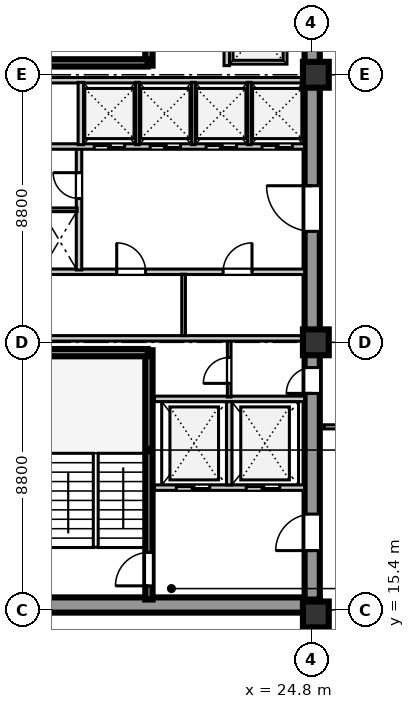
"""IFC4 building model, lengths in metres.
Left out: names, types, materials, properties, quantities, classifications, styles, units other than length and angle.
Written with IfcOpenShell. Run it as: python <this file> out.ifc"""

import sys

from ifc_helpers import new_model, si_unit, direction, frame, frame_2d, origin, origin_2d, place, context, subcontext, project, spatial, rectangle, extrude, element, fill, save


model = new_model("IFC4")
c1 = context("Model", 3, precision=1e-05, world=origin(), true_north=direction((0.0, 1.0)))
c2 = subcontext(c1, "Body", "Model", "MODEL_VIEW")
j1 = project(units=[si_unit("LENGTHUNIT", "METRE"), si_unit("PLANEANGLEUNIT", "RADIAN")], contexts=[c1])
p1 = place(None, origin())
s1 = spatial("IfcSite", under=j1, at=p1, CompositionType="ELEMENT")
p2 = place(p1, origin())
s2 = spatial("IfcBuilding", under=s1, at=p2, CompositionType="ELEMENT")
p3 = place(p2, frame((0.0, 0.0, 119.4)))
s3 = spatial("IfcBuildingStorey", under=s2, at=p3, CompositionType="ELEMENT", Elevation=119.4)
p4 = place(p3, frame((15.4, 15.56, 0.0), z_axis=(0.0, 0.0, 1.0), x_axis=(1.0, 0.0, 0.0)))
e1 = element("IfcWall", 1, at=p4, inside=s3, PredefinedType="SHEAR", context=c2, shape_type="SweptSolid", body=[
    extrude(rectangle(XDim=9.68, YDim=0.5, at=frame_2d((4.84, 0.0))), origin(), (0.0, 0.0, 1.0), 3.6),
])
p5 = place(p3, frame((24.83, 15.74, 0.0), z_axis=(0.0, 0.0, 1.0), x_axis=(0.0, 1.0, 0.0)))
e2 = element("IfcWall", 2, at=p5, inside=s3, PredefinedType="SHEAR", context=c2, shape_type="SweptSolid", body=[
    extrude(rectangle(XDim=25.76, YDim=0.5, at=frame_2d((12.88, 0.0))), origin(), (0.0, 0.0, 1.0), 3.6),
])
p6 = place(p5, frame((1.61, 0.0, 0.0)))
e3 = element("IfcOpeningElement", 3, at=p6, cuts=e2, PredefinedType="OPENING", context=c2, shape_type="SweptSolid", body=[
    extrude(rectangle(XDim=1.2, YDim=2.1, at=frame_2d((0.6, 1.05))), frame((0.0, 0.26, 0.0), z_axis=(0.0, -1.0, 0.0), x_axis=(1.0, 0.0, 0.0)), (0.0, 0.0, 1.0), 0.52),
])
p7 = place(p5, frame((6.78, 0.0, 0.0)))
e4 = element("IfcOpeningElement", 4, at=p7, cuts=e2, PredefinedType="OPENING", context=c2, shape_type="SweptSolid", body=[
    extrude(rectangle(XDim=0.85, YDim=2.06, at=frame_2d((0.425, 1.03))), frame((0.0, 0.26, 0.0), z_axis=(0.0, -1.0, 0.0), x_axis=(1.0, 0.0, 0.0)), (0.0, 0.0, 1.0), 0.52),
])
p8 = place(p5, frame((12.11, 0.0, 0.0)))
e5 = element("IfcOpeningElement", 5, at=p8, cuts=e2, PredefinedType="OPENING", context=c2, shape_type="SweptSolid", body=[
    extrude(rectangle(XDim=1.5, YDim=2.12, at=frame_2d((0.75, 1.06))), frame((0.0, 0.26, 0.0), z_axis=(0.0, -1.0, 0.0), x_axis=(1.0, 0.0, 0.0)), (0.0, 0.0, 1.0), 0.52),
])
p9 = place(p5, frame((20.11, 0.0, 0.0)))
e6 = element("IfcOpeningElement", 6, at=p9, cuts=e2, PredefinedType="OPENING", context=c2, shape_type="SweptSolid", body=[
    extrude(rectangle(XDim=1.2, YDim=2.12, at=frame_2d((0.6, 1.06))), frame((0.0, 0.26, 0.0), z_axis=(0.0, -1.0, 0.0), x_axis=(1.0, 0.0, 0.0)), (0.0, 0.0, 1.0), 0.52),
])
p10 = place(p5, frame((24.01, 0.0, 0.0)))
e7 = element("IfcOpeningElement", 7, at=p10, cuts=e2, PredefinedType="OPENING", context=c2, shape_type="SweptSolid", body=[
    extrude(rectangle(XDim=0.95, YDim=2.1, at=frame_2d((0.475, 1.05))), frame((0.0, 0.26, 0.0), z_axis=(0.0, -1.0, 0.0), x_axis=(1.0, 0.0, 0.0)), (0.0, 0.0, 1.0), 0.52),
])
for number, where, z_axis, x_axis in (
    (8, (24.95, 15.25, 0.0), (0.0, 0.0, 1.0), (1.0, 0.0, 0.0)),
    (9, (24.95, 24.2, 0.0), (0.0, 0.0, 1.0), (1.0, 0.0, 0.0)),
    (10, (24.95, 33.0, 0.0), (0.0, 0.0, 1.0), (1.0, 0.0, 0.0)),
):
    element("IfcColumn", number, at=place(p3, frame(where, z_axis=z_axis, x_axis=x_axis)), inside=s3, PredefinedType="COLUMN", context=c2, shape_type="SweptSolid", body=[
        extrude(rectangle(XDim=0.85, YDim=0.85, at=origin_2d()), origin(), (0.0, 0.0, 1.0), 3.6),
    ])
p11 = place(p3, frame((19.46, 15.74, 0.0), z_axis=(0.0, 0.0, 1.0), x_axis=(0.0, 1.0, 0.0)))
e11 = element("IfcWall", 11, at=p11, inside=s3, PredefinedType="SHEAR", context=c2, shape_type="SweptSolid", body=[
    extrude(rectangle(XDim=8.2, YDim=0.24, at=frame_2d((4.1, 0.0))), origin(), (0.0, 0.0, 1.0), 3.85),
])
p12 = place(p11, frame((0.45, 0.0, 0.0)))
e12 = element("IfcOpeningElement", 12, at=p12, cuts=e11, PredefinedType="OPENING", context=c2, shape_type="SweptSolid", body=[
    extrude(rectangle(XDim=1.1, YDim=2.1, at=frame_2d((0.55, 1.05))), frame((0.0, 0.13, 0.0), z_axis=(0.0, -1.0, 0.0), x_axis=(1.0, 0.0, 0.0)), (0.0, 0.0, 1.0), 0.26),
])
p13 = place(p3, frame((15.9, 23.86, 0.0), z_axis=(0.0, 0.0, 1.0), x_axis=(1.0, 0.0, 0.0)))
e13 = element("IfcWall", 13, at=p13, inside=s3, PredefinedType="SHEAR", context=c2, shape_type="SweptSolid", body=[
    extrude(rectangle(XDim=3.52, YDim=0.24, at=frame_2d((1.76, 0.0))), origin(), (0.0, 0.0, 1.0), 3.85),
])
p14 = place(p3, frame((19.64, 19.42, 0.0), z_axis=(0.0, 0.0, 1.0), x_axis=(1.0, 0.0, 0.0)))
e14 = element("IfcWall", 14, at=p14, inside=s3, PredefinedType="SOLIDWALL", context=c2, shape_type="SweptSolid", body=[
    extrude(rectangle(XDim=4.94, YDim=0.18, at=frame_2d((2.47, 0.0))), origin(), (0.0, 0.0, 1.0), 3.6),
])
p15 = place(p14, frame((0.72, 0.0, 0.0)))
e15 = element("IfcOpeningElement", 15, at=p15, cuts=e14, PredefinedType="OPENING", context=c2, shape_type="SweptSolid", body=[
    extrude(rectangle(XDim=1.1, YDim=2.1, at=frame_2d((0.55, 1.05))), frame((0.0, 0.1, 0.0), z_axis=(0.0, -1.0, 0.0), x_axis=(1.0, 0.0, 0.0)), (0.0, 0.0, 1.0), 0.2),
])
p16 = place(p14, frame((3.02, 0.0, 0.0)))
e16 = element("IfcOpeningElement", 16, at=p16, cuts=e14, PredefinedType="OPENING", context=c2, shape_type="SweptSolid", body=[
    extrude(rectangle(XDim=1.1, YDim=2.1, at=frame_2d((0.55, 1.05))), frame((0.0, 0.1, 0.0), z_axis=(0.0, -1.0, 0.0), x_axis=(1.0, 0.0, 0.0)), (0.0, 0.0, 1.0), 0.2),
])
p17 = place(p3, frame((22.1, 19.51, 0.0), z_axis=(0.0, 0.0, 1.0), x_axis=(0.0, 1.0, 0.0)))
e17 = element("IfcWall", 17, at=p17, inside=s3, PredefinedType="SOLIDWALL", context=c2, shape_type="SweptSolid", body=[
    extrude(rectangle(XDim=2.74, YDim=0.18, at=frame_2d((1.37, 0.0))), origin(), (0.0, 0.0, 1.0), 3.6),
])
p18 = place(p3, frame((19.64, 22.34, 0.0), z_axis=(0.0, 0.0, 1.0), x_axis=(1.0, 0.0, 0.0)))
e18 = element("IfcWall", 18, at=p18, inside=s3, PredefinedType="SOLIDWALL", context=c2, shape_type="SweptSolid", body=[
    extrude(rectangle(XDim=4.94, YDim=0.18, at=frame_2d((2.47, 0.0))), origin(), (0.0, 0.0, 1.0), 3.6),
])
p19 = place(p3, frame((22.1, 22.4, 0.0), z_axis=(0.0, 0.0, 1.0), x_axis=(0.0, 1.0, 0.0)))
e19 = element("IfcWall", 19, at=p19, inside=s3, PredefinedType="PARTITIONING", context=c2, shape_type="SweptSolid", body=[
    extrude(rectangle(XDim=1.88, YDim=0.12, at=frame_2d((0.94, 0.0))), origin(), (0.0, 0.0, 1.0), 3.6),
])
p20 = place(p19, frame((0.45, 0.0, 0.0)))
e20 = element("IfcOpeningElement", 20, at=p20, cuts=e19, PredefinedType="OPENING", context=c2, shape_type="SweptSolid", body=[
    extrude(rectangle(XDim=0.85, YDim=2.06, at=frame_2d((0.425, 1.03))), frame((0.0, 0.07, 0.0), z_axis=(0.0, -1.0, 0.0), x_axis=(1.0, 0.0, 0.0)), (0.0, 0.0, 1.0), 0.14),
])
p21 = place(p3, frame((15.9, 26.52, 0.0), z_axis=(0.0, 0.0, 1.0), x_axis=(1.0, 0.0, 0.0)))
e21 = element("IfcWall", 21, at=p21, inside=s3, PredefinedType="SOLIDWALL", context=c2, shape_type="SweptSolid", body=[
    extrude(rectangle(XDim=8.68, YDim=0.18, at=frame_2d((4.34, 0.0))), origin(), (0.0, 0.0, 1.0), 3.6),
])
p22 = place(p21, frame((2.5, 0.0, 0.0)))
e22 = element("IfcOpeningElement", 22, at=p22, cuts=e21, PredefinedType="OPENING", context=c2, shape_type="SweptSolid", body=[
    extrude(rectangle(XDim=0.95, YDim=2.1, at=frame_2d((0.475, 1.05))), frame((0.0, 0.1, 0.0), z_axis=(0.0, -1.0, 0.0), x_axis=(1.0, 0.0, 0.0)), (0.0, 0.0, 1.0), 0.2),
])
p23 = place(p21, frame((6.0, 0.0, 0.0)))
e23 = element("IfcOpeningElement", 23, at=p23, cuts=e21, PredefinedType="OPENING", context=c2, shape_type="SweptSolid", body=[
    extrude(rectangle(XDim=0.95, YDim=2.1, at=frame_2d((0.475, 1.05))), frame((0.0, 0.1, 0.0), z_axis=(0.0, -1.0, 0.0), x_axis=(1.0, 0.0, 0.0)), (0.0, 0.0, 1.0), 0.2),
])
p24 = place(p3, frame((15.9, 24.33, 0.0), z_axis=(0.0, 0.0, 1.0), x_axis=(1.0, 0.0, 0.0)))
e24 = element("IfcWall", 24, at=p24, inside=s3, PredefinedType="SOLIDWALL", context=c2, shape_type="SweptSolid", body=[
    extrude(rectangle(XDim=8.68, YDim=0.18, at=frame_2d((4.34, 0.0))), origin(), (0.0, 0.0, 1.0), 2.95),
])
p25 = place(p3, frame((20.6, 24.42, 0.0), z_axis=(0.0, 0.0, 1.0), x_axis=(0.0, 1.0, 0.0)))
e25 = element("IfcWall", 25, at=p25, inside=s3, PredefinedType="PARTITIONING", context=c2, shape_type="SweptSolid", body=[
    extrude(rectangle(XDim=2.02, YDim=0.12, at=frame_2d((1.01, 0.0))), origin(), (0.0, 0.0, 1.0), 3.6),
])
p26 = place(p3, frame((17.16, 26.58, 0.0), z_axis=(0.0, 0.0, 1.0), x_axis=(0.0, 1.0, 0.0)))
e26 = element("IfcWall", 26, at=p26, inside=s3, PredefinedType="SOLIDWALL", context=c2, shape_type="SweptSolid", body=[
    extrude(rectangle(XDim=4.02, YDim=0.18, at=frame_2d((2.01, 0.0))), origin(), (0.0, 0.0, 1.0), 3.6),
])
p27 = place(p26, frame((2.35, 0.0, 0.0)))
e27 = element("IfcOpeningElement", 27, at=p27, cuts=e26, PredefinedType="OPENING", context=c2, shape_type="SweptSolid", body=[
    extrude(rectangle(XDim=0.85, YDim=2.06, at=frame_2d((0.425, 1.03))), frame((0.0, 0.1, 0.0), z_axis=(0.0, -1.0, 0.0), x_axis=(1.0, 0.0, 0.0)), (0.0, 0.0, 1.0), 0.2),
])
p28 = place(p3, frame((15.9, 28.56, 0.0), z_axis=(0.0, 0.0, 1.0), x_axis=(1.0, 0.0, 0.0)))
e28 = element("IfcWall", 28, at=p28, inside=s3, PredefinedType="PARTITIONING", context=c2, shape_type="SweptSolid", body=[
    extrude(rectangle(XDim=1.2, YDim=0.12, at=frame_2d((0.6, 0.0))), origin(), (0.0, 0.0, 1.0), 3.6),
])
p29 = place(p3, frame((15.9, 30.64, 0.0), z_axis=(0.0, 0.0, 1.0), x_axis=(1.0, 0.0, 0.0)))
e29 = element("IfcWall", 29, at=p29, inside=s3, PredefinedType="SOLIDWALL", context=c2, shape_type="SweptSolid", body=[
    extrude(rectangle(XDim=8.68, YDim=0.18, at=frame_2d((4.34, 0.0))), origin(), (0.0, 0.0, 1.0), 3.6),
])
p30 = place(p29, frame((1.76, 0.0, 0.0)))
e30 = element("IfcOpeningElement", 30, at=p30, cuts=e29, PredefinedType="OPENING", context=c2, shape_type="SweptSolid", body=[
    extrude(rectangle(XDim=1.0, YDim=2.1, at=frame_2d((0.5, 1.05))), frame((0.0, 0.1, 0.0), z_axis=(0.0, -1.0, 0.0), x_axis=(1.0, 0.0, 0.0)), (0.0, 0.0, 1.0), 0.2),
])
p31 = place(p29, frame((3.6, 0.0, 0.0)))
e31 = element("IfcOpeningElement", 31, at=p31, cuts=e29, PredefinedType="OPENING", context=c2, shape_type="SweptSolid", body=[
    extrude(rectangle(XDim=1.0, YDim=2.1, at=frame_2d((0.5, 1.05))), frame((0.0, 0.1, 0.0), z_axis=(0.0, -1.0, 0.0), x_axis=(1.0, 0.0, 0.0)), (0.0, 0.0, 1.0), 0.2),
])
p32 = place(p29, frame((5.44, 0.0, 0.0)))
e32 = element("IfcOpeningElement", 32, at=p32, cuts=e29, PredefinedType="OPENING", context=c2, shape_type="SweptSolid", body=[
    extrude(rectangle(XDim=1.0, YDim=2.1, at=frame_2d((0.5, 1.05))), frame((0.0, 0.1, 0.0), z_axis=(0.0, -1.0, 0.0), x_axis=(1.0, 0.0, 0.0)), (0.0, 0.0, 1.0), 0.2),
])
p33 = place(p29, frame((7.28, 0.0, 0.0)))
e33 = element("IfcOpeningElement", 33, at=p33, cuts=e29, PredefinedType="OPENING", context=c2, shape_type="SweptSolid", body=[
    extrude(rectangle(XDim=1.0, YDim=2.1, at=frame_2d((0.5, 1.05))), frame((0.0, 0.1, 0.0), z_axis=(0.0, -1.0, 0.0), x_axis=(1.0, 0.0, 0.0)), (0.0, 0.0, 1.0), 0.2),
])
p34 = place(p3, frame((15.9, 32.82, 0.0), z_axis=(0.0, 0.0, 1.0), x_axis=(1.0, 0.0, 0.0)))
e34 = element("IfcWall", 34, at=p34, inside=s3, PredefinedType="SOLIDWALL", context=c2, shape_type="SweptSolid", body=[
    extrude(rectangle(XDim=8.68, YDim=0.18, at=frame_2d((4.34, 0.0))), origin(), (0.0, 0.0, 1.0), 2.95),
])
p35 = place(p3, frame((17.22, 30.7, 0.0), z_axis=(0.0, 0.0, 1.0), x_axis=(0.0, 1.0, 0.0)))
e35 = element("IfcWall", 35, at=p35, inside=s3, PredefinedType="SOLIDWALL", context=c2, shape_type="SweptSolid", body=[
    extrude(rectangle(XDim=2.05, YDim=0.18, at=frame_2d((1.025, 0.0))), origin(), (0.0, 0.0, 1.0), 3.6),
])
for number, where, z_axis, x_axis in (
    (36, (19.08, 30.7, 0.0), (0.0, 0.0, 1.0), (0.0, 1.0, 0.0)),
    (37, (20.92, 30.7, 0.0), (0.0, 0.0, 1.0), (0.0, 1.0, 0.0)),
    (38, (22.76, 30.7, 0.0), (0.0, 0.0, 1.0), (0.0, 1.0, 0.0)),
):
    element("IfcWall", number, at=place(p3, frame(where, z_axis=z_axis, x_axis=x_axis)), inside=s3, PredefinedType="PARTITIONING", context=c2, shape_type="SweptSolid", body=[
        extrude(rectangle(XDim=2.05, YDim=0.12, at=frame_2d((1.025, 0.0))), origin(), (0.0, 0.0, 1.0), 3.6),
    ])
p36 = place(p3, frame((19.46, 33.3, 0.0), z_axis=(0.0, 0.0, 1.0), x_axis=(0.0, 1.0, 0.0)))
e39 = element("IfcWall", 39, at=p36, inside=s3, PredefinedType="SHEAR", context=c2, shape_type="SweptSolid", body=[
    extrude(rectangle(XDim=8.18, YDim=0.24, at=frame_2d((4.09, 0.0))), origin(), (0.0, 0.0, 1.0), 3.85),
])
p37 = place(p36, frame((0.65, 0.0, 0.0)))
e40 = element("IfcOpeningElement", 40, at=p37, cuts=e39, PredefinedType="OPENING", context=c2, shape_type="SweptSolid", body=[
    extrude(rectangle(XDim=1.1, YDim=2.1, at=frame_2d((0.55, 1.05))), frame((0.0, 0.13, 0.0), z_axis=(0.0, -1.0, 0.0), x_axis=(1.0, 0.0, 0.0)), (0.0, 0.0, 1.0), 0.26),
])
p38 = place(p3, frame((15.9, 33.39, 0.0), z_axis=(0.0, 0.0, 1.0), x_axis=(1.0, 0.0, 0.0)))
e41 = element("IfcWall", 41, at=p38, inside=s3, PredefinedType="SHEAR", context=c2, shape_type="SweptSolid", body=[
    extrude(rectangle(XDim=3.52, YDim=0.24, at=frame_2d((1.76, 0.0))), origin(), (0.0, 0.0, 1.0), 3.85),
])
p39 = place(p3, frame((22.02, 33.3, 0.0), z_axis=(0.0, 0.0, 1.0), x_axis=(0.0, 1.0, 0.0)))
e42 = element("IfcWall", 42, at=p39, inside=s3, PredefinedType="SOLIDWALL", context=c2, shape_type="SweptSolid", body=[
    extrude(rectangle(XDim=2.01, YDim=0.18, at=frame_2d((1.005, 0.0))), origin(), (0.0, 0.0, 1.0), 3.6),
])
p40 = place(p3, frame((25.22, 21.42, 0.0), z_axis=(0.0, 0.0, 1.0), x_axis=(1.0, 0.0, 0.0)))
e43 = element("IfcWall", 43, at=p40, inside=s3, PredefinedType="PARTITIONING", context=c2, shape_type="SweptSolid", body=[
    extrude(rectangle(XDim=15.6, YDim=0.135, at=frame_2d((7.8, 0.0))), origin(), (0.0, 0.0, 1.0), 3.2),
])
p41 = place(p40, frame((0.73, 0.0, 0.0)))
e44 = element("IfcOpeningElement", 44, at=p41, cuts=e43, PredefinedType="OPENING", context=c2, shape_type="SweptSolid", body=[
    extrude(rectangle(XDim=0.95, YDim=2.1, at=frame_2d((0.475, 1.05))), frame((0.0, 0.078, 0.0), z_axis=(0.0, -1.0, 0.0), x_axis=(1.0, 0.0, 0.0)), (0.0, 0.0, 1.0), 0.155),
])
p42 = place(p40, frame((8.43, 0.0, 0.0)))
e45 = element("IfcOpeningElement", 45, at=p42, cuts=e43, PredefinedType="OPENING", context=c2, shape_type="SweptSolid", body=[
    extrude(rectangle(XDim=0.95, YDim=2.1, at=frame_2d((0.475, 1.05))), frame((0.0, 0.078, 0.0), z_axis=(0.0, -1.0, 0.0), x_axis=(1.0, 0.0, 0.0)), (0.0, 0.0, 1.0), 0.155),
])
p43 = place(p12, origin())
e46 = element("IfcDoor", 46, at=p43, inside=s3, OperationType="SINGLE_SWING_LEFT", PredefinedType="DOOR", context=c2, shape_type="SweptSolid", body=[
    extrude(rectangle(XDim=1.1, YDim=2.1, at=frame_2d((0.55, 1.05))), frame((0.0, 0.025, 0.0), z_axis=(0.0, -1.0, 0.0), x_axis=(1.0, 0.0, 0.0)), (0.0, 0.0, 1.0), 0.05),
])
fill(e12, e46)
p44 = place(p15, origin())
e47 = element("IfcDoor", 47, at=p44, inside=s3, OperationType="DOUBLE_DOOR_SLIDING", PredefinedType="DOOR", context=c2, shape_type="SweptSolid", body=[
    extrude(rectangle(XDim=1.1, YDim=2.1, at=frame_2d((0.55, 1.05))), frame((0.0, 0.025, 0.0), z_axis=(0.0, -1.0, 0.0), x_axis=(1.0, 0.0, 0.0)), (0.0, 0.0, 1.0), 0.05),
])
fill(e15, e47)
p45 = place(p16, origin())
e48 = element("IfcDoor", 48, at=p45, inside=s3, OperationType="DOUBLE_DOOR_SLIDING", PredefinedType="DOOR", context=c2, shape_type="SweptSolid", body=[
    extrude(rectangle(XDim=1.1, YDim=2.1, at=frame_2d((0.55, 1.05))), frame((0.0, 0.025, 0.0), z_axis=(0.0, -1.0, 0.0), x_axis=(1.0, 0.0, 0.0)), (0.0, 0.0, 1.0), 0.05),
])
fill(e16, e48)
p46 = place(p6, frame((1.2, 0.0, 0.0), z_axis=(0.0, 0.0, 1.0), x_axis=(-1.0, 0.0, 0.0)))
e49 = element("IfcDoor", 49, at=p46, inside=s3, OperationType="SINGLE_SWING_RIGHT", PredefinedType="DOOR", context=c2, shape_type="SweptSolid", body=[
    extrude(rectangle(XDim=1.2, YDim=2.1, at=frame_2d((0.6, 1.05))), frame((0.0, 0.025, 0.0), z_axis=(0.0, -1.0, 0.0), x_axis=(1.0, 0.0, 0.0)), (0.0, 0.0, 1.0), 0.05),
])
fill(e3, e49)
p47 = place(p20, origin())
e50 = element("IfcDoor", 50, at=p47, inside=s3, OperationType="SINGLE_SWING_LEFT", PredefinedType="DOOR", context=c2, shape_type="SweptSolid", body=[
    extrude(rectangle(XDim=0.85, YDim=2.06, at=frame_2d((0.425, 1.03))), frame((0.0, 0.025, 0.0), z_axis=(0.0, -1.0, 0.0), x_axis=(1.0, 0.0, 0.0)), (0.0, 0.0, 1.0), 0.05),
])
fill(e20, e50)
p48 = place(p7, frame((0.85, 0.0, 0.0), z_axis=(0.0, 0.0, 1.0), x_axis=(-1.0, 0.0, 0.0)))
e51 = element("IfcDoor", 51, at=p48, inside=s3, OperationType="SINGLE_SWING_RIGHT", PredefinedType="DOOR", context=c2, shape_type="SweptSolid", body=[
    extrude(rectangle(XDim=0.85, YDim=2.06, at=frame_2d((0.425, 1.03))), frame((0.0, 0.025, 0.0), z_axis=(0.0, -1.0, 0.0), x_axis=(1.0, 0.0, 0.0)), (0.0, 0.0, 1.0), 0.05),
])
fill(e4, e51)
p49 = place(p22, origin())
e52 = element("IfcDoor", 52, at=p49, inside=s3, OperationType="SINGLE_SWING_LEFT", PredefinedType="DOOR", context=c2, shape_type="SweptSolid", body=[
    extrude(rectangle(XDim=0.95, YDim=2.1, at=frame_2d((0.475, 1.05))), frame((0.0, 0.025, 0.0), z_axis=(0.0, -1.0, 0.0), x_axis=(1.0, 0.0, 0.0)), (0.0, 0.0, 1.0), 0.05),
])
fill(e22, e52)
p50 = place(p23, origin())
e53 = element("IfcDoor", 53, at=p50, inside=s3, OperationType="SINGLE_SWING_RIGHT", PredefinedType="DOOR", context=c2, shape_type="SweptSolid", body=[
    extrude(rectangle(XDim=0.95, YDim=2.1, at=frame_2d((0.475, 1.05))), frame((0.0, 0.025, 0.0), z_axis=(0.0, -1.0, 0.0), x_axis=(1.0, 0.0, 0.0)), (0.0, 0.0, 1.0), 0.05),
])
fill(e23, e53)
p51 = place(p27, origin())
e54 = element("IfcDoor", 54, at=p51, inside=s3, OperationType="SINGLE_SWING_RIGHT", PredefinedType="DOOR", context=c2, shape_type="SweptSolid", body=[
    extrude(rectangle(XDim=0.85, YDim=2.06, at=frame_2d((0.425, 1.03))), frame((0.0, 0.025, 0.0), z_axis=(0.0, -1.0, 0.0), x_axis=(1.0, 0.0, 0.0)), (0.0, 0.0, 1.0), 0.05),
])
fill(e27, e54)
p52 = place(p8, frame((1.5, 0.0, 0.0), z_axis=(0.0, 0.0, 1.0), x_axis=(-1.0, 0.0, 0.0)))
e55 = element("IfcDoor", 55, at=p52, inside=s3, OperationType="SINGLE_SWING_LEFT", PredefinedType="DOOR", context=c2, shape_type="SweptSolid", body=[
    extrude(rectangle(XDim=1.5, YDim=2.12, at=frame_2d((0.75, 1.06))), frame((0.0, 0.025, 0.0), z_axis=(0.0, -1.0, 0.0), x_axis=(1.0, 0.0, 0.0)), (0.0, 0.0, 1.0), 0.05),
])
fill(e5, e55)
p53 = place(p30, frame((1.0, 0.0, 0.0), z_axis=(0.0, 0.0, 1.0), x_axis=(-1.0, 0.0, 0.0)))
e56 = element("IfcDoor", 56, at=p53, inside=s3, OperationType="DOUBLE_DOOR_SLIDING", PredefinedType="DOOR", context=c2, shape_type="SweptSolid", body=[
    extrude(rectangle(XDim=1.0, YDim=2.1, at=frame_2d((0.5, 1.05))), frame((0.0, 0.025, 0.0), z_axis=(0.0, -1.0, 0.0), x_axis=(1.0, 0.0, 0.0)), (0.0, 0.0, 1.0), 0.05),
])
fill(e30, e56)
p54 = place(p31, frame((1.0, 0.0, 0.0), z_axis=(0.0, 0.0, 1.0), x_axis=(-1.0, 0.0, 0.0)))
e57 = element("IfcDoor", 57, at=p54, inside=s3, OperationType="DOUBLE_DOOR_SLIDING", PredefinedType="DOOR", context=c2, shape_type="SweptSolid", body=[
    extrude(rectangle(XDim=1.0, YDim=2.1, at=frame_2d((0.5, 1.05))), frame((0.0, 0.025, 0.0), z_axis=(0.0, -1.0, 0.0), x_axis=(1.0, 0.0, 0.0)), (0.0, 0.0, 1.0), 0.05),
])
fill(e31, e57)
p55 = place(p32, frame((1.0, 0.0, 0.0), z_axis=(0.0, 0.0, 1.0), x_axis=(-1.0, 0.0, 0.0)))
e58 = element("IfcDoor", 58, at=p55, inside=s3, OperationType="DOUBLE_DOOR_SLIDING", PredefinedType="DOOR", context=c2, shape_type="SweptSolid", body=[
    extrude(rectangle(XDim=1.0, YDim=2.1, at=frame_2d((0.5, 1.05))), frame((0.0, 0.025, 0.0), z_axis=(0.0, -1.0, 0.0), x_axis=(1.0, 0.0, 0.0)), (0.0, 0.0, 1.0), 0.05),
])
fill(e32, e58)
p56 = place(p33, frame((1.0, 0.0, 0.0), z_axis=(0.0, 0.0, 1.0), x_axis=(-1.0, 0.0, 0.0)))
e59 = element("IfcDoor", 59, at=p56, inside=s3, OperationType="DOUBLE_DOOR_SLIDING", PredefinedType="DOOR", context=c2, shape_type="SweptSolid", body=[
    extrude(rectangle(XDim=1.0, YDim=2.1, at=frame_2d((0.5, 1.05))), frame((0.0, 0.025, 0.0), z_axis=(0.0, -1.0, 0.0), x_axis=(1.0, 0.0, 0.0)), (0.0, 0.0, 1.0), 0.05),
])
fill(e33, e59)
save(model, sys.argv[1])
